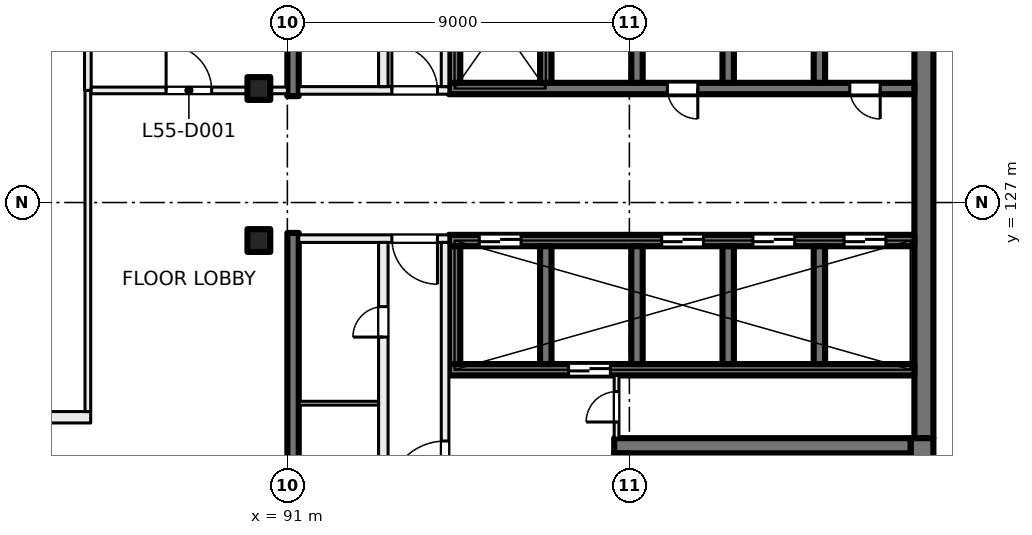
"""IFC4 building model, lengths in metres.
Left out: names, types, materials, properties, quantities, classifications, styles, units other than length and angle.
Written with IfcOpenShell. Run it as: python <this file> out.ifc"""

import sys

from ifc_helpers import new_model, si_unit, direction, frame, frame_2d, origin, origin_2d, place, context, subcontext, project, spatial, rectangle, extrude, element, fill, save


model = new_model("IFC4")
c1 = context("Model", 3, precision=1e-05, world=origin(), true_north=direction((0.0, 1.0)))
c2 = subcontext(c1, "Body", "Model", "MODEL_VIEW")
j1 = project(units=[si_unit("LENGTHUNIT", "METRE"), si_unit("PLANEANGLEUNIT", "RADIAN")], contexts=[c1])
p1 = place(None, origin())
s1 = spatial("IfcSite", under=j1, at=p1, CompositionType="ELEMENT")
p2 = place(p1, origin())
s2 = spatial("IfcBuilding", under=s1, at=p2, CompositionType="ELEMENT")
p3 = place(p2, frame((0.0, 0.0, 232.0)))
s3 = spatial("IfcBuildingStorey", under=s2, at=p3, CompositionType="ELEMENT", Elevation=232.0)
for number, where, z_axis, x_axis in (
    (1, (90.25, 130.0, 0.0), (0.0, 0.0, 1.0), (1.0, 0.0, 0.0)),
    (2, (90.25, 126.0, 0.0), (0.0, 0.0, 1.0), (1.0, 0.0, 0.0)),
):
    element("IfcColumn", number, at=place(p3, frame(where, z_axis=z_axis, x_axis=x_axis)), inside=s3, PredefinedType="COLUMN", context=c2, shape_type="SweptSolid", body=[
        extrude(rectangle(XDim=0.6, YDim=0.6, at=origin_2d()), origin(), (0.0, 0.0, 1.0), 4.0),
    ])
p4 = place(p3, frame((107.75, 135.2, 0.0), z_axis=(0.0, 0.0, 1.0), x_axis=(0.0, -1.0, 0.0)))
e3 = element("IfcWall", 3, at=p4, inside=s3, PredefinedType="SHEAR", context=c2, shape_type="SweptSolid", body=[
    extrude(rectangle(XDim=14.4, YDim=0.5, at=frame_2d((7.2, 0.0))), origin(), (0.0, 0.0, 1.0), 4.0),
])
p5 = place(p3, frame((107.7, 120.8, 0.0), z_axis=(0.0, 0.0, 1.0), x_axis=(0.0, -1.0, 0.0)))
e4 = element("IfcWall", 4, at=p5, inside=s3, PredefinedType="SHEAR", context=c2, shape_type="SweptSolid", body=[
    extrude(rectangle(XDim=3.8, YDim=0.6, at=frame_2d((1.9, 0.0))), origin(), (0.0, 0.0, 1.0), 4.0),
])
p6 = place(p3, frame((107.4, 120.6, 0.0), z_axis=(0.0, 0.0, 1.0), x_axis=(-1.0, 0.0, 0.0)))
e5 = element("IfcWall", 5, at=p6, inside=s3, PredefinedType="SHEAR", context=c2, shape_type="SweptSolid", body=[
    extrude(rectangle(XDim=7.8, YDim=0.4, at=frame_2d((3.9, 0.0))), origin(), (0.0, 0.0, 1.0), 4.0),
])
p7 = place(p3, frame((99.8, 120.4, 0.0), z_axis=(0.0, 0.0, 1.0), x_axis=(0.0, -1.0, 0.0)))
e6 = element("IfcWall", 6, at=p7, inside=s3, PredefinedType="SHEAR", context=c2, shape_type="SweptSolid", body=[
    extrude(rectangle(XDim=2.8, YDim=0.4, at=frame_2d((1.4, 0.0))), origin(), (0.0, 0.0, 1.0), 4.0),
])
p8 = place(p7, frame((0.95, 0.0, 0.0)))
e7 = element("IfcOpeningElement", 7, at=p8, cuts=e6, PredefinedType="OPENING", context=c2, shape_type="SweptSolid", body=[
    extrude(rectangle(XDim=1.0, YDim=2.1, at=frame_2d((0.5, 1.05))), frame((0.0, 0.21, 0.0), z_axis=(0.0, -1.0, 0.0), x_axis=(1.0, 0.0, 0.0)), (0.0, 0.0, 1.0), 0.42),
])
p9 = place(p3, frame((107.5, 130.0, 0.0), z_axis=(0.0, 0.0, 1.0), x_axis=(-1.0, 0.0, 0.0)))
e8 = element("IfcWall", 8, at=p9, inside=s3, PredefinedType="SHEAR", context=c2, shape_type="SweptSolid", body=[
    extrude(rectangle(XDim=12.25, YDim=0.3, at=frame_2d((6.125, 0.0))), origin(), (0.0, 0.0, 1.0), 4.0),
])
p10 = place(p9, frame((0.9, 0.0, 0.0)))
e9 = element("IfcOpeningElement", 9, at=p10, cuts=e8, PredefinedType="OPENING", context=c2, shape_type="SweptSolid", body=[
    extrude(rectangle(XDim=0.8, YDim=2.1, at=frame_2d((0.4, 1.05))), frame((0.0, 0.16, 0.0), z_axis=(0.0, -1.0, 0.0), x_axis=(1.0, 0.0, 0.0)), (0.0, 0.0, 1.0), 0.32),
])
p11 = place(p9, frame((5.7, 0.0, 0.0)))
e10 = element("IfcOpeningElement", 10, at=p11, cuts=e8, PredefinedType="OPENING", context=c2, shape_type="SweptSolid", body=[
    extrude(rectangle(XDim=0.8, YDim=2.1, at=frame_2d((0.4, 1.05))), frame((0.0, 0.16, 0.0), z_axis=(0.0, -1.0, 0.0), x_axis=(1.0, 0.0, 0.0)), (0.0, 0.0, 1.0), 0.32),
])
for number, where, z_axis, x_axis in (
    (11, (105.0, 133.25, 0.0), (0.0, 0.0, 1.0), (0.0, -1.0, 0.0)),
    (12, (102.6, 133.25, 0.0), (0.0, 0.0, 1.0), (0.0, -1.0, 0.0)),
    (13, (100.2, 133.25, 0.0), (0.0, 0.0, 1.0), (0.0, -1.0, 0.0)),
    (14, (97.8, 133.25, 0.0), (0.0, 0.0, 1.0), (0.0, -1.0, 0.0)),
    (15, (95.4, 133.25, 0.0), (0.0, 0.0, 1.0), (0.0, -1.0, 0.0)),
):
    element("IfcWall", number, at=place(p3, frame(where, z_axis=z_axis, x_axis=x_axis)), inside=s3, PredefinedType="SHEAR", context=c2, shape_type="SweptSolid", body=[
        extrude(rectangle(XDim=3.1, YDim=0.3, at=frame_2d((1.55, 0.0))), origin(), (0.0, 0.0, 1.0), 4.0),
    ])
p12 = place(p3, frame((107.5, 126.0, 0.0), z_axis=(0.0, 0.0, 1.0), x_axis=(-1.0, 0.0, 0.0)))
e16 = element("IfcWall", 16, at=p12, inside=s3, PredefinedType="SHEAR", context=c2, shape_type="SweptSolid", body=[
    extrude(rectangle(XDim=12.25, YDim=0.3, at=frame_2d((6.125, 0.0))), origin(), (0.0, 0.0, 1.0), 4.0),
])
p13 = place(p12, frame((0.75, 0.0, 0.0)))
e17 = element("IfcOpeningElement", 17, at=p13, cuts=e16, PredefinedType="OPENING", context=c2, shape_type="SweptSolid", body=[
    extrude(rectangle(XDim=1.1, YDim=2.1, at=frame_2d((0.55, 1.05))), frame((0.0, 0.16, 0.0), z_axis=(0.0, -1.0, 0.0), x_axis=(1.0, 0.0, 0.0)), (0.0, 0.0, 1.0), 0.32),
])
p14 = place(p12, frame((3.15, 0.0, 0.0)))
e18 = element("IfcOpeningElement", 18, at=p14, cuts=e16, PredefinedType="OPENING", context=c2, shape_type="SweptSolid", body=[
    extrude(rectangle(XDim=1.1, YDim=2.1, at=frame_2d((0.55, 1.05))), frame((0.0, 0.16, 0.0), z_axis=(0.0, -1.0, 0.0), x_axis=(1.0, 0.0, 0.0)), (0.0, 0.0, 1.0), 0.32),
])
p15 = place(p12, frame((5.55, 0.0, 0.0)))
e19 = element("IfcOpeningElement", 19, at=p15, cuts=e16, PredefinedType="OPENING", context=c2, shape_type="SweptSolid", body=[
    extrude(rectangle(XDim=1.1, YDim=2.1, at=frame_2d((0.55, 1.05))), frame((0.0, 0.16, 0.0), z_axis=(0.0, -1.0, 0.0), x_axis=(1.0, 0.0, 0.0)), (0.0, 0.0, 1.0), 0.32),
])
p16 = place(p12, frame((10.35, 0.0, 0.0)))
e20 = element("IfcOpeningElement", 20, at=p16, cuts=e16, PredefinedType="OPENING", context=c2, shape_type="SweptSolid", body=[
    extrude(rectangle(XDim=1.1, YDim=2.1, at=frame_2d((0.55, 1.05))), frame((0.0, 0.16, 0.0), z_axis=(0.0, -1.0, 0.0), x_axis=(1.0, 0.0, 0.0)), (0.0, 0.0, 1.0), 0.32),
])
p17 = place(p3, frame((107.5, 122.6, 0.0), z_axis=(0.0, 0.0, 1.0), x_axis=(-1.0, 0.0, 0.0)))
e21 = element("IfcWall", 21, at=p17, inside=s3, PredefinedType="SHEAR", context=c2, shape_type="SweptSolid", body=[
    extrude(rectangle(XDim=12.25, YDim=0.3, at=frame_2d((6.125, 0.0))), origin(), (0.0, 0.0, 1.0), 4.0),
])
p18 = place(p17, frame((8.0, 0.0, 0.0)))
e22 = element("IfcOpeningElement", 22, at=p18, cuts=e21, PredefinedType="OPENING", context=c2, shape_type="SweptSolid", body=[
    extrude(rectangle(XDim=1.1, YDim=2.1, at=frame_2d((0.55, 1.05))), frame((0.0, 0.16, 0.0), z_axis=(0.0, -1.0, 0.0), x_axis=(1.0, 0.0, 0.0)), (0.0, 0.0, 1.0), 0.32),
])
for number, where, z_axis, x_axis in (
    (23, (105.0, 125.85, 0.0), (0.0, 0.0, 1.0), (0.0, -1.0, 0.0)),
    (24, (102.6, 125.85, 0.0), (0.0, 0.0, 1.0), (0.0, -1.0, 0.0)),
    (25, (100.2, 125.85, 0.0), (0.0, 0.0, 1.0), (0.0, -1.0, 0.0)),
    (26, (97.8, 125.85, 0.0), (0.0, 0.0, 1.0), (0.0, -1.0, 0.0)),
    (27, (95.4, 125.85, 0.0), (0.0, 0.0, 1.0), (0.0, -1.0, 0.0)),
):
    element("IfcWall", number, at=place(p3, frame(where, z_axis=z_axis, x_axis=x_axis)), inside=s3, PredefinedType="SHEAR", context=c2, shape_type="SweptSolid", body=[
        extrude(rectangle(XDim=3.1, YDim=0.3, at=frame_2d((1.55, 0.0))), origin(), (0.0, 0.0, 1.0), 4.0),
    ])
for number, where, z_axis, x_axis in (
    (28, (91.15, 138.5, 0.0), (0.0, 0.0, 1.0), (0.0, -1.0, 0.0)),
    (29, (91.15, 126.2, 0.0), (0.0, 0.0, 1.0), (0.0, -1.0, 0.0)),
):
    element("IfcWall", number, at=place(p3, frame(where, z_axis=z_axis, x_axis=x_axis)), inside=s3, PredefinedType="SHEAR", context=c2, shape_type="SweptSolid", body=[
        extrude(rectangle(XDim=8.7, YDim=0.3, at=frame_2d((4.35, 0.0))), origin(), (0.0, 0.0, 1.0), 4.0),
    ])
p19 = place(p3, frame((95.25, 126.05, 0.0), z_axis=(0.0, 0.0, 1.0), x_axis=(-1.0, 0.0, 0.0)))
e30 = element("IfcWall", 30, at=p19, inside=s3, PredefinedType="PARTITIONING", context=c2, shape_type="SweptSolid", body=[
    extrude(rectangle(XDim=3.95, YDim=0.2, at=frame_2d((1.975, 0.0))), origin(), (0.0, 0.0, 1.0), 3.625),
])
p20 = place(p19, frame((0.3, 0.0, 0.0)))
e31 = element("IfcOpeningElement", 31, at=p20, cuts=e30, PredefinedType="OPENING", context=c2, shape_type="SweptSolid", body=[
    extrude(rectangle(XDim=1.2, YDim=2.1, at=frame_2d((0.6, 1.05))), frame((0.0, 0.11, 0.0), z_axis=(0.0, -1.0, 0.0), x_axis=(1.0, 0.0, 0.0)), (0.0, 0.0, 1.0), 0.22),
])
p21 = place(p3, frame((95.15, 117.5, 0.0), z_axis=(0.0, 0.0, 1.0), x_axis=(0.0, 1.0, 0.0)))
e32 = element("IfcWall", 32, at=p21, inside=s3, PredefinedType="PARTITIONING", context=c2, shape_type="SweptSolid", body=[
    extrude(rectangle(XDim=8.45, YDim=0.2, at=frame_2d((4.225, 0.0))), origin(), (0.0, 0.0, 1.0), 3.625),
])
p22 = place(p21, frame((1.725, 0.0, 0.0)))
e33 = element("IfcOpeningElement", 33, at=p22, cuts=e32, PredefinedType="OPENING", context=c2, shape_type="SweptSolid", body=[
    extrude(rectangle(XDim=1.5, YDim=2.1, at=frame_2d((0.75, 1.05))), frame((0.0, 0.11, 0.0), z_axis=(0.0, -1.0, 0.0), x_axis=(1.0, 0.0, 0.0)), (0.0, 0.0, 1.0), 0.22),
])
p23 = place(p3, frame((93.525, 117.5, 0.0), z_axis=(0.0, 0.0, 1.0), x_axis=(0.0, 1.0, 0.0)))
e34 = element("IfcWall", 34, at=p23, inside=s3, PredefinedType="PARTITIONING", context=c2, shape_type="SweptSolid", body=[
    extrude(rectangle(XDim=8.45, YDim=0.25, at=frame_2d((4.225, 0.0))), origin(), (0.0, 0.0, 1.0), 3.625),
])
p24 = place(p23, frame((5.96, 0.0, 0.0)))
e35 = element("IfcOpeningElement", 35, at=p24, cuts=e34, PredefinedType="OPENING", context=c2, shape_type="SweptSolid", body=[
    extrude(rectangle(XDim=0.8, YDim=2.1, at=frame_2d((0.4, 1.05))), frame((0.0, 0.135, 0.0), z_axis=(0.0, -1.0, 0.0), x_axis=(1.0, 0.0, 0.0)), (0.0, 0.0, 1.0), 0.27),
])
p25 = place(p23, frame((1.685, 0.0, 0.0)))
e36 = element("IfcOpeningElement", 36, at=p25, cuts=e34, PredefinedType="OPENING", context=c2, shape_type="SweptSolid", body=[
    extrude(rectangle(XDim=0.8, YDim=2.1, at=frame_2d((0.4, 1.05))), frame((0.0, 0.135, 0.0), z_axis=(0.0, -1.0, 0.0), x_axis=(1.0, 0.0, 0.0)), (0.0, 0.0, 1.0), 0.27),
])
p26 = place(p3, frame((99.663, 120.8, 0.0), z_axis=(0.0, 0.0, 1.0), x_axis=(0.0, 1.0, 0.0)))
e37 = element("IfcWall", 37, at=p26, inside=s3, PredefinedType="PARTITIONING", context=c2, shape_type="SweptSolid", body=[
    extrude(rectangle(XDim=1.65, YDim=0.125, at=frame_2d((0.825, 0.0))), origin(), (0.0, 0.0, 1.0), 3.625),
])
p27 = place(p26, frame((0.425, 0.0, 0.0)))
e38 = element("IfcOpeningElement", 38, at=p27, cuts=e37, PredefinedType="OPENING", context=c2, shape_type="SweptSolid", body=[
    extrude(rectangle(XDim=0.8, YDim=2.1, at=frame_2d((0.4, 1.05))), frame((0.0, 0.073, 0.0), z_axis=(0.0, -1.0, 0.0), x_axis=(1.0, 0.0, 0.0)), (0.0, 0.0, 1.0), 0.145),
])
p28 = place(p3, frame((93.4, 121.72, 0.0), z_axis=(0.0, 0.0, 1.0), x_axis=(-1.0, 0.0, 0.0)))
e39 = element("IfcWall", 39, at=p28, inside=s3, PredefinedType="PARTITIONING", context=c2, shape_type="SweptSolid", body=[
    extrude(rectangle(XDim=2.1, YDim=0.1, at=frame_2d((1.05, 0.0))), origin(), (0.0, 0.0, 1.0), 3.625),
])
p29 = place(p3, frame((91.3, 129.95, 0.0), z_axis=(0.0, 0.0, 1.0), x_axis=(1.0, 0.0, 0.0)))
e40 = element("IfcWall", 40, at=p29, inside=s3, PredefinedType="PARTITIONING", context=c2, shape_type="SweptSolid", body=[
    extrude(rectangle(XDim=3.95, YDim=0.2, at=frame_2d((1.975, 0.0))), origin(), (0.0, 0.0, 1.0), 3.625),
])
p30 = place(p29, frame((2.45, 0.0, 0.0)))
e41 = element("IfcOpeningElement", 41, at=p30, cuts=e40, PredefinedType="OPENING", context=c2, shape_type="SweptSolid", body=[
    extrude(rectangle(XDim=1.2, YDim=2.1, at=frame_2d((0.6, 1.05))), frame((0.0, 0.11, 0.0), z_axis=(0.0, -1.0, 0.0), x_axis=(1.0, 0.0, 0.0)), (0.0, 0.0, 1.0), 0.22),
])
p31 = place(p3, frame((95.15, 130.05, 0.0), z_axis=(0.0, 0.0, 1.0), x_axis=(0.0, 1.0, 0.0)))
e42 = element("IfcWall", 42, at=p31, inside=s3, PredefinedType="PARTITIONING", context=c2, shape_type="SweptSolid", body=[
    extrude(rectangle(XDim=8.45, YDim=0.2, at=frame_2d((4.225, 0.0))), origin(), (0.0, 0.0, 1.0), 3.625),
])
p32 = place(p31, frame((5.225, 0.0, 0.0)))
e43 = element("IfcOpeningElement", 43, at=p32, cuts=e42, PredefinedType="OPENING", context=c2, shape_type="SweptSolid", body=[
    extrude(rectangle(XDim=1.5, YDim=2.1, at=frame_2d((0.75, 1.05))), frame((0.0, 0.11, 0.0), z_axis=(0.0, -1.0, 0.0), x_axis=(1.0, 0.0, 0.0)), (0.0, 0.0, 1.0), 0.22),
])
p33 = place(p3, frame((93.525, 130.05, 0.0), z_axis=(0.0, 0.0, 1.0), x_axis=(0.0, 1.0, 0.0)))
e44 = element("IfcWall", 44, at=p33, inside=s3, PredefinedType="PARTITIONING", context=c2, shape_type="SweptSolid", body=[
    extrude(rectangle(XDim=8.45, YDim=0.25, at=frame_2d((4.225, 0.0))), origin(), (0.0, 0.0, 1.0), 3.625),
])
p34 = place(p33, frame((0.985, 0.0, 0.0)))
e45 = element("IfcOpeningElement", 45, at=p34, cuts=e44, PredefinedType="OPENING", context=c2, shape_type="SweptSolid", body=[
    extrude(rectangle(XDim=0.8, YDim=2.1, at=frame_2d((0.4, 1.05))), frame((0.0, 0.135, 0.0), z_axis=(0.0, -1.0, 0.0), x_axis=(1.0, 0.0, 0.0)), (0.0, 0.0, 1.0), 0.27),
])
p35 = place(p33, frame((5.26, 0.0, 0.0)))
e46 = element("IfcOpeningElement", 46, at=p35, cuts=e44, PredefinedType="OPENING", context=c2, shape_type="SweptSolid", body=[
    extrude(rectangle(XDim=0.8, YDim=2.1, at=frame_2d((0.4, 1.05))), frame((0.0, 0.135, 0.0), z_axis=(0.0, -1.0, 0.0), x_axis=(1.0, 0.0, 0.0)), (0.0, 0.0, 1.0), 0.27),
])
p36 = place(p3, frame((50.506, 121.35, 0.0), z_axis=(0.0, 0.0, 1.0), x_axis=(1.0, 0.0, 0.0)))
e47 = element("IfcWall", 47, at=p36, inside=s3, PredefinedType="PARTITIONING", context=c2, shape_type="SweptSolid", body=[
    extrude(rectangle(XDim=35.319, YDim=0.3, at=frame_2d((17.659, 0.0))), origin(), (0.0, 0.0, 1.0), 3.625),
])
p37 = place(p36, frame((13.844, 0.0, 0.0)))
e48 = element("IfcOpeningElement", 48, at=p37, cuts=e47, PredefinedType="OPENING", context=c2, shape_type="SweptSolid", body=[
    extrude(rectangle(XDim=0.8, YDim=2.1, at=frame_2d((0.4, 1.05))), frame((0.0, 0.16, 0.0), z_axis=(0.0, -1.0, 0.0), x_axis=(1.0, 0.0, 0.0)), (0.0, 0.0, 1.0), 0.32),
])
p38 = place(p36, frame((9.144, 0.0, 0.0)))
e49 = element("IfcOpeningElement", 49, at=p38, cuts=e47, PredefinedType="OPENING", context=c2, shape_type="SweptSolid", body=[
    extrude(rectangle(XDim=1.2, YDim=2.1, at=frame_2d((0.6, 1.05))), frame((0.0, 0.16, 0.0), z_axis=(0.0, -1.0, 0.0), x_axis=(1.0, 0.0, 0.0)), (0.0, 0.0, 1.0), 0.32),
])
p39 = place(p36, frame((24.594, 0.0, 0.0)))
e50 = element("IfcOpeningElement", 50, at=p39, cuts=e47, PredefinedType="OPENING", context=c2, shape_type="SweptSolid", body=[
    extrude(rectangle(XDim=1.8, YDim=2.1, at=frame_2d((0.9, 1.05))), frame((0.0, 0.16, 0.0), z_axis=(0.0, -1.0, 0.0), x_axis=(1.0, 0.0, 0.0)), (0.0, 0.0, 1.0), 0.32),
])
p40 = place(p36, frame((2.543, 0.0, 0.0)))
e51 = element("IfcOpeningElement", 51, at=p40, cuts=e47, PredefinedType="OPENING", context=c2, shape_type="SweptSolid", body=[
    extrude(rectangle(XDim=1.8, YDim=2.1, at=frame_2d((0.9, 1.05))), frame((0.0, 0.16, 0.0), z_axis=(0.0, -1.0, 0.0), x_axis=(1.0, 0.0, 0.0)), (0.0, 0.0, 1.0), 0.32),
])
p41 = place(p3, frame((85.75, 121.5, 0.0), z_axis=(0.0, 0.0, 1.0), x_axis=(0.0, 1.0, 0.0)))
e52 = element("IfcWall", 52, at=p41, inside=s3, PredefinedType="PARTITIONING", context=c2, shape_type="SweptSolid", body=[
    extrude(rectangle(XDim=8.45, YDim=0.15, at=frame_2d((4.225, 0.0))), origin(), (0.0, 0.0, 1.0), 3.625),
])
p42 = place(p3, frame((85.75, 129.95, 0.0), z_axis=(0.0, 0.0, 1.0), x_axis=(0.0, 1.0, 0.0)))
e53 = element("IfcWall", 53, at=p42, inside=s3, PredefinedType="PARTITIONING", context=c2, shape_type="SweptSolid", body=[
    extrude(rectangle(XDim=8.45, YDim=0.175, at=frame_2d((4.225, 0.0))), origin(), (0.0, 0.0, 1.0), 3.625),
])
p43 = place(p3, frame((85.838, 129.95, 0.0), z_axis=(0.0, 0.0, 1.0), x_axis=(1.0, 0.0, 0.0)))
e54 = element("IfcWall", 54, at=p43, inside=s3, PredefinedType="PARTITIONING", context=c2, shape_type="SweptSolid", body=[
    extrude(rectangle(XDim=5.162, YDim=0.175, at=frame_2d((2.581, 0.0))), origin(), (0.0, 0.0, 1.0), 3.625),
])
p44 = place(p43, frame((1.971, 0.0, 0.0)))
e55 = element("IfcOpeningElement", 55, at=p44, cuts=e54, PredefinedType="OPENING", context=c2, shape_type="SweptSolid", body=[
    extrude(rectangle(XDim=1.2, YDim=2.1, at=frame_2d((0.6, 1.05))), frame((0.0, 0.097, 0.0), z_axis=(0.0, -1.0, 0.0), x_axis=(1.0, 0.0, 0.0)), (0.0, 0.0, 1.0), 0.195),
])
p45 = place(p13, origin())
e56 = element("IfcDoor", 56, at=p45, inside=s3, OperationType="DOUBLE_DOOR_SLIDING", PredefinedType="DOOR", context=c2, shape_type="SweptSolid", body=[
    extrude(rectangle(XDim=1.1, YDim=2.1, at=frame_2d((0.55, 1.05))), frame((0.0, 0.025, 0.0), z_axis=(0.0, -1.0, 0.0), x_axis=(1.0, 0.0, 0.0)), (0.0, 0.0, 1.0), 0.05),
])
fill(e17, e56)
p46 = place(p14, origin())
e57 = element("IfcDoor", 57, at=p46, inside=s3, OperationType="DOUBLE_DOOR_SLIDING", PredefinedType="DOOR", context=c2, shape_type="SweptSolid", body=[
    extrude(rectangle(XDim=1.1, YDim=2.1, at=frame_2d((0.55, 1.05))), frame((0.0, 0.025, 0.0), z_axis=(0.0, -1.0, 0.0), x_axis=(1.0, 0.0, 0.0)), (0.0, 0.0, 1.0), 0.05),
])
fill(e18, e57)
p47 = place(p15, origin())
e58 = element("IfcDoor", 58, at=p47, inside=s3, OperationType="DOUBLE_DOOR_SLIDING", PredefinedType="DOOR", context=c2, shape_type="SweptSolid", body=[
    extrude(rectangle(XDim=1.1, YDim=2.1, at=frame_2d((0.55, 1.05))), frame((0.0, 0.025, 0.0), z_axis=(0.0, -1.0, 0.0), x_axis=(1.0, 0.0, 0.0)), (0.0, 0.0, 1.0), 0.05),
])
fill(e19, e58)
p48 = place(p16, origin())
e59 = element("IfcDoor", 59, at=p48, inside=s3, OperationType="DOUBLE_DOOR_SLIDING", PredefinedType="DOOR", context=c2, shape_type="SweptSolid", body=[
    extrude(rectangle(XDim=1.1, YDim=2.1, at=frame_2d((0.55, 1.05))), frame((0.0, 0.025, 0.0), z_axis=(0.0, -1.0, 0.0), x_axis=(1.0, 0.0, 0.0)), (0.0, 0.0, 1.0), 0.05),
])
fill(e20, e59)
p49 = place(p10, origin())
e60 = element("IfcDoor", 60, at=p49, inside=s3, OperationType="SINGLE_SWING_LEFT", PredefinedType="DOOR", context=c2, shape_type="SweptSolid", body=[
    extrude(rectangle(XDim=0.8, YDim=2.1, at=frame_2d((0.4, 1.05))), frame((0.0, 0.025, 0.0), z_axis=(0.0, -1.0, 0.0), x_axis=(1.0, 0.0, 0.0)), (0.0, 0.0, 1.0), 0.05),
])
fill(e9, e60)
p50 = place(p11, origin())
e61 = element("IfcDoor", 61, at=p50, inside=s3, OperationType="SINGLE_SWING_RIGHT", PredefinedType="DOOR", context=c2, shape_type="SweptSolid", body=[
    extrude(rectangle(XDim=0.8, YDim=2.1, at=frame_2d((0.4, 1.05))), frame((0.0, 0.025, 0.0), z_axis=(0.0, -1.0, 0.0), x_axis=(1.0, 0.0, 0.0)), (0.0, 0.0, 1.0), 0.05),
])
fill(e10, e61)
p51 = place(p20, origin())
e62 = element("IfcDoor", 62, at=p51, inside=s3, OperationType="DOUBLE_DOOR_SINGLE_SWING", PredefinedType="DOOR", context=c2, shape_type="SweptSolid", body=[
    extrude(rectangle(XDim=1.2, YDim=2.1, at=frame_2d((0.6, 1.05))), frame((0.0, 0.025, 0.0), z_axis=(0.0, -1.0, 0.0), x_axis=(1.0, 0.0, 0.0)), (0.0, 0.0, 1.0), 0.05),
])
fill(e31, e62)
p52 = place(p22, origin())
e63 = element("IfcDoor", 63, at=p52, inside=s3, OperationType="DOUBLE_DOOR_SINGLE_SWING", PredefinedType="DOOR", context=c2, shape_type="SweptSolid", body=[
    extrude(rectangle(XDim=1.5, YDim=2.1, at=frame_2d((0.75, 1.05))), frame((0.0, 0.025, 0.0), z_axis=(0.0, -1.0, 0.0), x_axis=(1.0, 0.0, 0.0)), (0.0, 0.0, 1.0), 0.05),
])
fill(e33, e63)
p53 = place(p27, origin())
e64 = element("IfcDoor", 64, at=p53, inside=s3, OperationType="SINGLE_SWING_RIGHT", PredefinedType="DOOR", context=c2, shape_type="SweptSolid", body=[
    extrude(rectangle(XDim=0.8, YDim=2.1, at=frame_2d((0.4, 1.05))), frame((0.0, 0.025, 0.0), z_axis=(0.0, -1.0, 0.0), x_axis=(1.0, 0.0, 0.0)), (0.0, 0.0, 1.0), 0.05),
])
fill(e38, e64)
p54 = place(p24, origin())
e65 = element("IfcDoor", 65, at=p54, inside=s3, OperationType="SINGLE_SWING_LEFT", PredefinedType="DOOR", context=c2, shape_type="SweptSolid", body=[
    extrude(rectangle(XDim=0.8, YDim=2.1, at=frame_2d((0.4, 1.05))), frame((0.0, 0.025, 0.0), z_axis=(0.0, -1.0, 0.0), x_axis=(1.0, 0.0, 0.0)), (0.0, 0.0, 1.0), 0.05),
])
fill(e35, e65)
p55 = place(p30, origin())
e66 = element("IfcDoor", 66, at=p55, inside=s3, OperationType="DOUBLE_DOOR_SINGLE_SWING", PredefinedType="DOOR", context=c2, shape_type="SweptSolid", body=[
    extrude(rectangle(XDim=1.2, YDim=2.1, at=frame_2d((0.6, 1.05))), frame((0.0, 0.025, 0.0), z_axis=(0.0, -1.0, 0.0), x_axis=(1.0, 0.0, 0.0)), (0.0, 0.0, 1.0), 0.05),
])
fill(e41, e66)
p56 = place(p18, origin())
e67 = element("IfcDoor", 67, at=p56, inside=s3, OperationType="DOUBLE_DOOR_SLIDING", PredefinedType="DOOR", context=c2, shape_type="SweptSolid", body=[
    extrude(rectangle(XDim=1.1, YDim=2.1, at=frame_2d((0.55, 1.05))), frame((0.0, 0.025, 0.0), z_axis=(0.0, -1.0, 0.0), x_axis=(1.0, 0.0, 0.0)), (0.0, 0.0, 1.0), 0.05),
])
fill(e22, e67)
p57 = place(p44, origin())
e68 = element("IfcDoor", 68, at=p57, inside=s3, OperationType="DOUBLE_DOOR_SINGLE_SWING", PredefinedType="DOOR", context=c2, shape_type="SweptSolid", body=[
    extrude(rectangle(XDim=1.2, YDim=2.1, at=frame_2d((0.6, 1.05))), frame((0.0, 0.025, 0.0), z_axis=(0.0, -1.0, 0.0), x_axis=(1.0, 0.0, 0.0)), (0.0, 0.0, 1.0), 0.05),
])
fill(e55, e68)
save(model, sys.argv[1])
